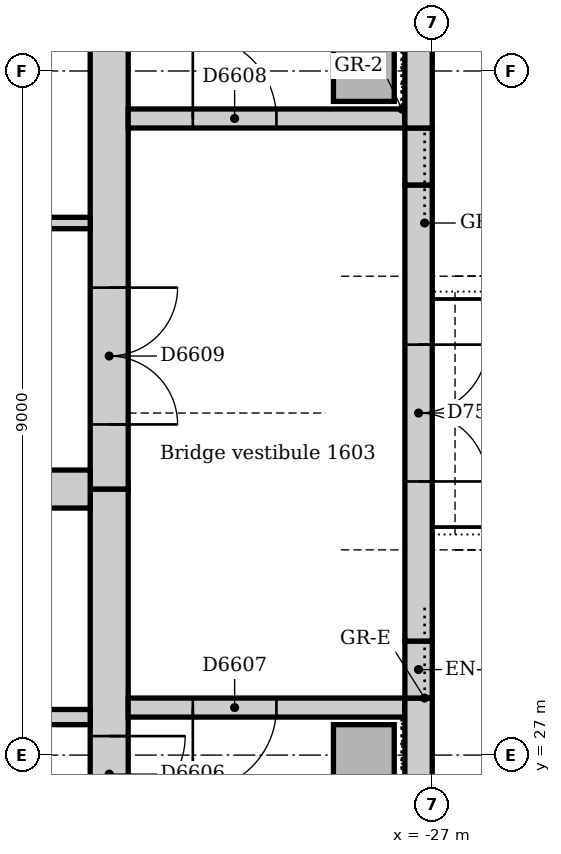
"""IFC4 building model, lengths in metres.
Left out: names, types, materials, properties, quantities, classifications, styles, units other than length and angle.
Written with IfcOpenShell. Run it as: python <this file> out.ifc"""

import sys

from ifc_helpers import new_model, si_unit, direction, frame, frame_2d, origin, origin_2d, place, context, subcontext, project, spatial, rectangle, extrude, element, fill, save


model = new_model("IFC4")
c1 = context("Model", 3, precision=1e-05, world=origin(), true_north=direction((0.0, 1.0)))
c2 = subcontext(c1, "Body", "Model", "MODEL_VIEW")
j1 = project(units=[si_unit("LENGTHUNIT", "METRE"), si_unit("PLANEANGLEUNIT", "RADIAN")], contexts=[c1])
p1 = place(None, origin())
s1 = spatial("IfcSite", under=j1, at=p1, CompositionType="ELEMENT")
p2 = place(p1, origin())
s2 = spatial("IfcBuilding", under=s1, at=p2, CompositionType="ELEMENT")
p3 = place(p2, frame((0.0, 0.0, 71.0)))
s3 = spatial("IfcBuildingStorey", under=s2, at=p3, CompositionType="ELEMENT", Elevation=71.0)
p4 = place(p3, frame((-31.25, 21.0, 0.0), z_axis=(0.0, 0.0, 1.0), x_axis=(0.0, 1.0, 0.0)))
e1 = element("IfcWall", 1, at=p4, inside=s3, PredefinedType="SOLIDWALL", context=c2, shape_type="SweptSolid", body=[
    extrude(rectangle(XDim=9.5, YDim=0.5, at=frame_2d((4.75, 0.0))), origin(), (0.0, 0.0, 1.0), 4.0),
])
p5 = place(p4, frame((5.25, 0.0, 0.0)))
e2 = element("IfcOpeningElement", 2, at=p5, cuts=e1, PredefinedType="OPENING", context=c2, shape_type="SweptSolid", body=[
    extrude(rectangle(XDim=1.0, YDim=2.1, at=frame_2d((0.5, 1.05))), frame((0.0, 0.26, 0.0), z_axis=(0.0, -1.0, 0.0), x_axis=(1.0, 0.0, 0.0)), (0.0, 0.0, 1.0), 0.52),
])
p6 = place(p3, frame((-31.25, 30.5, 0.0), z_axis=(0.0, 0.0, 1.0), x_axis=(0.0, 1.0, 0.0)))
e3 = element("IfcWall", 3, at=p6, inside=s3, PredefinedType="SOLIDWALL", context=c2, shape_type="SweptSolid", body=[
    extrude(rectangle(XDim=11.5, YDim=0.5, at=frame_2d((5.75, 0.0))), origin(), (0.0, 0.0, 1.0), 4.0),
])
p7 = place(p6, frame((0.85, 0.0, 0.0)))
e4 = element("IfcOpeningElement", 4, at=p7, cuts=e3, PredefinedType="OPENING", context=c2, shape_type="SweptSolid", body=[
    extrude(rectangle(XDim=1.8, YDim=2.1, at=frame_2d((0.9, 1.05))), frame((0.0, 0.26, 0.0), z_axis=(0.0, -1.0, 0.0), x_axis=(1.0, 0.0, 0.0)), (0.0, 0.0, 1.0), 0.52),
])
p8 = place(p3, frame((-42.0, 30.5, 0.0), z_axis=(0.0, 0.0, 1.0), x_axis=(1.0, 0.0, 0.0)))
e5 = element("IfcWall", 5, at=p8, inside=s3, PredefinedType="SOLIDWALL", context=c2, shape_type="SweptSolid", body=[
    extrude(rectangle(XDim=10.5, YDim=0.5, at=frame_2d((5.25, 0.0))), origin(), (0.0, 0.0, 1.0), 4.0),
])
p9 = place(p3, frame((-27.36, 27.625, 0.0), z_axis=(0.0, 0.0, 1.0), x_axis=(-1.0, 0.0, 0.0)))
e6 = element("IfcWall", 6, at=p9, inside=s3, PredefinedType="SOLIDWALL", context=c2, shape_type="SweptSolid", body=[
    extrude(rectangle(XDim=3.64, YDim=0.25, at=frame_2d((1.82, 0.0))), origin(), (0.0, 0.0, 1.0), 4.0),
])
p10 = place(p9, frame((1.69, 0.0, 0.0)))
e7 = element("IfcOpeningElement", 7, at=p10, cuts=e6, PredefinedType="OPENING", context=c2, shape_type="SweptSolid", body=[
    extrude(rectangle(XDim=1.1, YDim=2.1, at=frame_2d((0.55, 1.05))), frame((0.0, 0.135, 0.0), z_axis=(0.0, -1.0, 0.0), x_axis=(1.0, 0.0, 0.0)), (0.0, 0.0, 1.0), 0.27),
])
p11 = place(p3, frame((-31.0, 35.375, 0.0), z_axis=(0.0, 0.0, 1.0), x_axis=(1.0, 0.0, 0.0)))
e8 = element("IfcWall", 8, at=p11, inside=s3, PredefinedType="SOLIDWALL", context=c2, shape_type="SweptSolid", body=[
    extrude(rectangle(XDim=3.64, YDim=0.25, at=frame_2d((1.82, 0.0))), origin(), (0.0, 0.0, 1.0), 4.0),
])
p12 = place(p11, frame((0.85, 0.0, 0.0)))
e9 = element("IfcOpeningElement", 9, at=p12, cuts=e8, PredefinedType="OPENING", context=c2, shape_type="SweptSolid", body=[
    extrude(rectangle(XDim=1.1, YDim=2.1, at=frame_2d((0.55, 1.05))), frame((0.0, 0.135, 0.0), z_axis=(0.0, -1.0, 0.0), x_axis=(1.0, 0.0, 0.0)), (0.0, 0.0, 1.0), 0.27),
])
for number, where, z_axis, x_axis in (
    (10, (-27.9, 27.0, 0.0), (0.0, 0.0, 1.0), (1.0, 0.0, 0.0)),
    (11, (-27.9, 36.0, 0.0), (0.0, 0.0, 1.0), (1.0, 0.0, 0.0)),
):
    element("IfcColumn", number, at=place(p3, frame(where, z_axis=z_axis, x_axis=x_axis)), inside=s3, PredefinedType="COLUMN", context=c2, shape_type="SweptSolid", body=[
        extrude(rectangle(XDim=0.8, YDim=0.8, at=origin_2d()), origin(), (0.0, 0.0, 1.0), 4.0),
    ])
p13 = place(p3, frame((-27.18, 21.0, 0.0), z_axis=(0.0, 0.0, 1.0), x_axis=(0.0, 1.0, 0.0)))
e12 = element("IfcWall", 12, at=p13, inside=s3, PredefinedType="STANDARD", context=c2, shape_type="SweptSolid", body=[
    extrude(rectangle(XDim=6.75, YDim=0.36, at=frame_2d((3.375, 0.0))), origin(), (0.0, 0.0, 1.0), 3.85),
])
p14 = place(p3, frame((-27.18, 27.75, 0.0), z_axis=(0.0, 0.0, 1.0), x_axis=(0.0, 1.0, 0.0)))
e13 = element("IfcWall", 13, at=p14, inside=s3, PredefinedType="STANDARD", context=c2, shape_type="SweptSolid", body=[
    extrude(rectangle(XDim=0.75, YDim=0.36, at=frame_2d((0.375, 0.0))), origin(), (0.0, 0.0, 1.0), 3.85),
])
p15 = place(p3, frame((-27.18, 28.5, 0.0), z_axis=(0.0, 0.0, 1.0), x_axis=(0.0, 1.0, 0.0)))
e14 = element("IfcWall", 14, at=p15, inside=s3, PredefinedType="STANDARD", context=c2, shape_type="SweptSolid", body=[
    extrude(rectangle(XDim=6.0, YDim=0.36, at=frame_2d((3.0, 0.0))), origin(), (0.0, 0.0, 1.0), 3.85),
])
p16 = place(p15, frame((2.1, 0.0, 0.0)))
e15 = element("IfcOpeningElement", 15, at=p16, cuts=e14, PredefinedType="OPENING", context=c2, shape_type="SweptSolid", body=[
    extrude(rectangle(XDim=1.8, YDim=2.4, at=frame_2d((0.9, 1.2))), frame((0.0, 0.19, 0.0), z_axis=(0.0, -1.0, 0.0), x_axis=(1.0, 0.0, 0.0)), (0.0, 0.0, 1.0), 0.38),
])
p17 = place(p3, frame((-27.18, 34.5, 0.0), z_axis=(0.0, 0.0, 1.0), x_axis=(0.0, 1.0, 0.0)))
e16 = element("IfcWall", 16, at=p17, inside=s3, PredefinedType="STANDARD", context=c2, shape_type="SweptSolid", body=[
    extrude(rectangle(XDim=0.75, YDim=0.36, at=frame_2d((0.375, 0.0))), origin(), (0.0, 0.0, 1.0), 3.85),
])
p18 = place(p3, frame((-27.18, 35.25, 0.0), z_axis=(0.0, 0.0, 1.0), x_axis=(0.0, 1.0, 0.0)))
e17 = element("IfcWall", 17, at=p18, inside=s3, PredefinedType="STANDARD", context=c2, shape_type="SweptSolid", body=[
    extrude(rectangle(XDim=6.75, YDim=0.36, at=frame_2d((3.375, 0.0))), origin(), (0.0, 0.0, 1.0), 3.85),
])
p19 = place(p3, frame((-34.9, 27.5, 0.0), z_axis=(0.0, 0.0, 1.0), x_axis=(1.0, 0.0, 0.0)))
e18 = element("IfcWall", 18, at=p19, inside=s3, PredefinedType="SOLIDWALL", context=c2, shape_type="SweptSolid", body=[
    extrude(rectangle(XDim=3.4, YDim=0.2, at=frame_2d((1.7, 0.0))), origin(), (0.0, 0.0, 1.0), 4.0),
])
p20 = place(p19, frame((1.1, 0.0, 0.0)))
e19 = element("IfcOpeningElement", 19, at=p20, cuts=e18, PredefinedType="OPENING", context=c2, shape_type="SweptSolid", body=[
    extrude(rectangle(XDim=1.1, YDim=2.1, at=frame_2d((0.55, 1.05))), frame((0.0, 0.11, 0.0), z_axis=(0.0, -1.0, 0.0), x_axis=(1.0, 0.0, 0.0)), (0.0, 0.0, 1.0), 0.22),
])
p21 = place(p3, frame((-34.075, 34.0, 0.0), z_axis=(0.0, 0.0, 1.0), x_axis=(1.0, 0.0, 0.0)))
e20 = element("IfcWall", 20, at=p21, inside=s3, PredefinedType="SOLIDWALL", context=c2, shape_type="SweptSolid", body=[
    extrude(rectangle(XDim=2.575, YDim=0.15, at=frame_2d((1.288, 0.0))), origin(), (0.0, 0.0, 1.0), 4.0),
])
p22 = place(p16, frame((1.8, 0.0, 0.0), z_axis=(0.0, 0.0, 1.0), x_axis=(-1.0, 0.0, 0.0)))
e21 = element("IfcDoor", 21, at=p22, inside=s3, OperationType="DOUBLE_DOOR_SINGLE_SWING", PredefinedType="DOOR", context=c2, shape_type="SweptSolid", body=[
    extrude(rectangle(XDim=1.8, YDim=2.4, at=frame_2d((0.9, 1.2))), frame((0.0, -0.07, 0.0), z_axis=(0.0, -1.0, 0.0), x_axis=(1.0, 0.0, 0.0)), (0.0, 0.0, 1.0), 0.05),
])
fill(e15, e21)
p23 = place(p5, frame((1.0, 0.0, 0.0), z_axis=(0.0, 0.0, 1.0), x_axis=(-1.0, 0.0, 0.0)))
e22 = element("IfcDoor", 22, at=p23, inside=s3, OperationType="SINGLE_SWING_LEFT", PredefinedType="DOOR", context=c2, shape_type="SweptSolid", body=[
    extrude(rectangle(XDim=1.0, YDim=2.1, at=frame_2d((0.5, 1.05))), frame((0.0, 0.025, 0.0), z_axis=(0.0, -1.0, 0.0), x_axis=(1.0, 0.0, 0.0)), (0.0, 0.0, 1.0), 0.05),
])
fill(e2, e22)
p24 = place(p10, origin())
e23 = element("IfcDoor", 23, at=p24, inside=s3, OperationType="SINGLE_SWING_RIGHT", PredefinedType="DOOR", context=c2, shape_type="SweptSolid", body=[
    extrude(rectangle(XDim=1.1, YDim=2.1, at=frame_2d((0.55, 1.05))), frame((0.0, 0.025, 0.0), z_axis=(0.0, -1.0, 0.0), x_axis=(1.0, 0.0, 0.0)), (0.0, 0.0, 1.0), 0.05),
])
fill(e7, e23)
p25 = place(p12, origin())
e24 = element("IfcDoor", 24, at=p25, inside=s3, OperationType="SINGLE_SWING_LEFT", PredefinedType="DOOR", context=c2, shape_type="SweptSolid", body=[
    extrude(rectangle(XDim=1.1, YDim=2.1, at=frame_2d((0.55, 1.05))), frame((0.0, 0.025, 0.0), z_axis=(0.0, -1.0, 0.0), x_axis=(1.0, 0.0, 0.0)), (0.0, 0.0, 1.0), 0.05),
])
fill(e9, e24)
p26 = place(p7, frame((1.8, 0.0, 0.0), z_axis=(0.0, 0.0, 1.0), x_axis=(-1.0, 0.0, 0.0)))
e25 = element("IfcDoor", 25, at=p26, inside=s3, OperationType="DOUBLE_DOOR_SINGLE_SWING", PredefinedType="DOOR", context=c2, shape_type="SweptSolid", body=[
    extrude(rectangle(XDim=1.8, YDim=2.1, at=frame_2d((0.9, 1.05))), frame((0.0, 0.025, 0.0), z_axis=(0.0, -1.0, 0.0), x_axis=(1.0, 0.0, 0.0)), (0.0, 0.0, 1.0), 0.05),
])
fill(e4, e25)
save(model, sys.argv[1])
